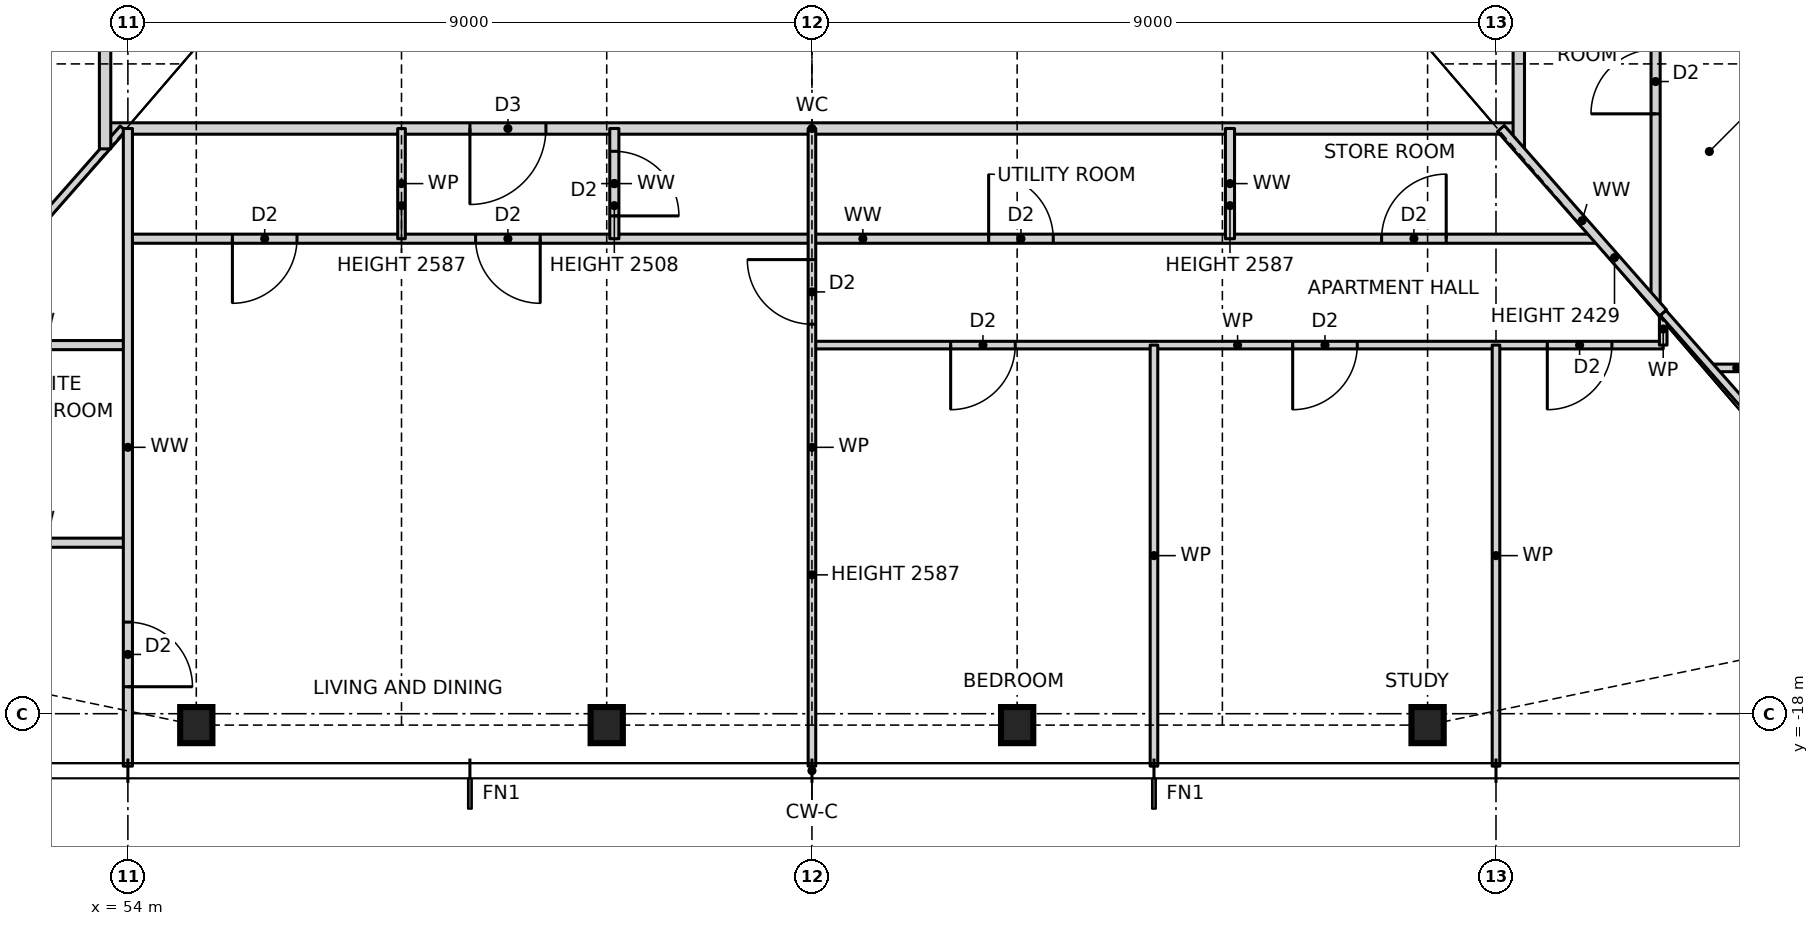
"""IFC4 building model, lengths in metres.
Left out: names, types, materials, properties, quantities, classifications, styles, units other than length and angle.
Written with IfcOpenShell. Run it as: python <this file> out.ifc"""

import sys

from ifc_helpers import new_model, si_unit, direction, frame, frame_2d, origin, origin_2d, place, context, subcontext, project, spatial, rectangle, i_section, extrude, element, fill, save


model = new_model("IFC4")
c1 = context("Model", 3, precision=1e-05, world=origin(), true_north=direction((0.0, 1.0)))
c2 = subcontext(c1, "Body", "Model", "MODEL_VIEW")
j1 = project(units=[si_unit("LENGTHUNIT", "METRE"), si_unit("PLANEANGLEUNIT", "RADIAN")], contexts=[c1])
p1 = place(None, origin())
s1 = spatial("IfcSite", under=j1, at=p1, CompositionType="ELEMENT")
p2 = place(p1, origin())
s2 = spatial("IfcBuilding", under=s1, at=p2, CompositionType="ELEMENT")
p3 = place(p2, frame((0.0, 0.0, 29.0)))
s3 = spatial("IfcBuildingStorey", under=s2, at=p3, CompositionType="ELEMENT", Elevation=29.0)
for number, where, z_axis, x_axis in (
    (1, (54.9, -18.15, 0.0), (0.0, 0.0, 1.0), (1.0, 0.0, 0.0)),
    (2, (60.3, -18.15, 0.0), (0.0, 0.0, 1.0), (1.0, 0.0, 0.0)),
    (3, (65.7, -18.15, 0.0), (0.0, 0.0, 1.0), (1.0, 0.0, 0.0)),
    (4, (71.1, -18.15, 0.0), (0.0, 0.0, 1.0), (1.0, 0.0, 0.0)),
):
    element("IfcColumn", number, at=place(p3, frame(where, z_axis=z_axis, x_axis=x_axis)), inside=s3, PredefinedType="COLUMN", context=c2, shape_type="SweptSolid", body=[
        extrude(i_section(OverallWidth=0.424, OverallDepth=0.475, WebThickness=0.048, FlangeThickness=0.077, at=origin_2d()), origin(), (0.0, 0.0, 1.0), 3.5),
    ])
p4 = place(p3, frame((51.6, -15.75, 0.0), z_axis=(0.0, 0.0, 1.0), x_axis=(1.0, 0.0, 0.0)))
e5 = element("IfcWall", 5, at=p4, inside=s3, PredefinedType="PARTITIONING", context=c2, shape_type="SweptSolid", body=[
    extrude(rectangle(XDim=2.4, YDim=0.12, at=frame_2d((1.2, 0.0))), origin(), (0.0, 0.0, 1.0), 3.27),
])
p5 = place(p3, frame((74.836, -13.45, 0.0), z_axis=(0.0, 0.0, 1.0), x_axis=(1.0, 0.0, 0.0)))
e6 = element("IfcWall", 6, at=p5, inside=s3, PredefinedType="PARTITIONING", context=c2, shape_type="SweptSolid", body=[
    extrude(rectangle(XDim=0.664, YDim=0.1, at=frame_2d((0.332, 0.0))), origin(), (0.0, 0.0, 1.0), 3.27),
])
p6 = place(p3, frame((51.6, -13.15, 0.0), z_axis=(0.0, 0.0, 1.0), x_axis=(1.0, 0.0, 0.0)))
e7 = element("IfcWall", 7, at=p6, inside=s3, PredefinedType="PARTITIONING", context=c2, shape_type="SweptSolid", body=[
    extrude(rectangle(XDim=2.4, YDim=0.12, at=frame_2d((1.2, 0.0))), origin(), (0.0, 0.0, 1.0), 3.27),
])
p7 = place(p3, frame((63.0, -13.15, 0.0), z_axis=(0.0, 0.0, 1.0), x_axis=(1.0, 0.0, 0.0)))
e8 = element("IfcWall", 8, at=p7, inside=s3, PredefinedType="PARTITIONING", context=c2, shape_type="SweptSolid", body=[
    extrude(rectangle(XDim=11.2, YDim=0.1, at=frame_2d((5.6, 0.0))), origin(), (0.0, 0.0, 1.0), 3.27),
])
p8 = place(p7, frame((1.825, 0.0, 0.0)))
e9 = element("IfcOpeningElement", 9, at=p8, cuts=e8, PredefinedType="OPENING", context=c2, shape_type="SweptSolid", body=[
    extrude(rectangle(XDim=0.85, YDim=2.1, at=frame_2d((0.425, 1.05))), frame((0.0, 0.06, 0.0), z_axis=(0.0, -1.0, 0.0), x_axis=(1.0, 0.0, 0.0)), (0.0, 0.0, 1.0), 0.12),
])
p9 = place(p7, frame((6.325, 0.0, 0.0)))
e10 = element("IfcOpeningElement", 10, at=p9, cuts=e8, PredefinedType="OPENING", context=c2, shape_type="SweptSolid", body=[
    extrude(rectangle(XDim=0.85, YDim=2.1, at=frame_2d((0.425, 1.05))), frame((0.0, 0.06, 0.0), z_axis=(0.0, -1.0, 0.0), x_axis=(1.0, 0.0, 0.0)), (0.0, 0.0, 1.0), 0.12),
])
p10 = place(p7, frame((9.675, 0.0, 0.0)))
e11 = element("IfcOpeningElement", 11, at=p10, cuts=e8, PredefinedType="OPENING", context=c2, shape_type="SweptSolid", body=[
    extrude(rectangle(XDim=0.85, YDim=2.1, at=frame_2d((0.425, 1.05))), frame((0.0, 0.06, 0.0), z_axis=(0.0, -1.0, 0.0), x_axis=(1.0, 0.0, 0.0)), (0.0, 0.0, 1.0), 0.12),
])
p11 = place(p3, frame((54.0, -11.75, 0.0), z_axis=(0.0, 0.0, 1.0), x_axis=(1.0, 0.0, 0.0)))
e12 = element("IfcWall", 12, at=p11, inside=s3, PredefinedType="PARTITIONING", context=c2, shape_type="SweptSolid", body=[
    extrude(rectangle(XDim=19.34, YDim=0.12, at=frame_2d((9.67, 0.0))), origin(), (0.0, 0.0, 1.0), 3.27),
])
p12 = place(p11, frame((1.375, 0.0, 0.0)))
e13 = element("IfcOpeningElement", 13, at=p12, cuts=e12, PredefinedType="OPENING", context=c2, shape_type="SweptSolid", body=[
    extrude(rectangle(XDim=0.85, YDim=2.1, at=frame_2d((0.425, 1.05))), frame((0.0, 0.07, 0.0), z_axis=(0.0, -1.0, 0.0), x_axis=(1.0, 0.0, 0.0)), (0.0, 0.0, 1.0), 0.14),
])
p13 = place(p11, frame((4.575, 0.0, 0.0)))
e14 = element("IfcOpeningElement", 14, at=p13, cuts=e12, PredefinedType="OPENING", context=c2, shape_type="SweptSolid", body=[
    extrude(rectangle(XDim=0.85, YDim=2.1, at=frame_2d((0.425, 1.05))), frame((0.0, 0.07, 0.0), z_axis=(0.0, -1.0, 0.0), x_axis=(1.0, 0.0, 0.0)), (0.0, 0.0, 1.0), 0.14),
])
p14 = place(p11, frame((11.325, 0.0, 0.0)))
e15 = element("IfcOpeningElement", 15, at=p14, cuts=e12, PredefinedType="OPENING", context=c2, shape_type="SweptSolid", body=[
    extrude(rectangle(XDim=0.85, YDim=2.1, at=frame_2d((0.425, 1.05))), frame((0.0, 0.07, 0.0), z_axis=(0.0, -1.0, 0.0), x_axis=(1.0, 0.0, 0.0)), (0.0, 0.0, 1.0), 0.14),
])
p15 = place(p11, frame((16.495, 0.0, 0.0)))
e16 = element("IfcOpeningElement", 16, at=p15, cuts=e12, PredefinedType="OPENING", context=c2, shape_type="SweptSolid", body=[
    extrude(rectangle(XDim=0.85, YDim=2.1, at=frame_2d((0.425, 1.05))), frame((0.0, 0.07, 0.0), z_axis=(0.0, -1.0, 0.0), x_axis=(1.0, 0.0, 0.0)), (0.0, 0.0, 1.0), 0.14),
])
p16 = place(p3, frame((53.7, -10.3, 0.0), z_axis=(0.0, 0.0, 1.0), x_axis=(1.0, 0.0, 0.0)))
e17 = element("IfcWall", 17, at=p16, inside=s3, PredefinedType="PARTITIONING", context=c2, shape_type="SweptSolid", body=[
    extrude(rectangle(XDim=18.6, YDim=0.15, at=frame_2d((9.3, 0.0))), origin(), (0.0, 0.0, 1.0), 3.27),
])
p17 = place(p16, frame((4.8, 0.0, 0.0)))
e18 = element("IfcOpeningElement", 18, at=p17, cuts=e17, PredefinedType="OPENING", context=c2, shape_type="SweptSolid", body=[
    extrude(rectangle(XDim=1.0, YDim=2.1, at=frame_2d((0.5, 1.05))), frame((0.0, 0.085, 0.0), z_axis=(0.0, -1.0, 0.0), x_axis=(1.0, 0.0, 0.0)), (0.0, 0.0, 1.0), 0.17),
])
p18 = place(p3, frame((47.944, -17.109, 0.0), z_axis=(0.0, 0.0, 1.0), x_axis=(0.660638210404, 0.750704439146, 0.0)))
e19 = element("IfcWall", 19, at=p18, inside=s3, PredefinedType="PARTITIONING", context=c2, shape_type="SweptSolid", body=[
    extrude(rectangle(XDim=9.07, YDim=0.1, at=frame_2d((4.535, 0.0))), origin(), (0.0, 0.0, 1.0), 2.429),
])
p19 = place(p3, frame((74.2, -13.15, 0.0), z_axis=(0.0, 0.0, 1.0), x_axis=(0.0, 1.0, 0.0)))
e20 = element("IfcWall", 20, at=p19, inside=s3, PredefinedType="PARTITIONING", context=c2, shape_type="SweptSolid", body=[
    extrude(rectangle(XDim=0.423, YDim=0.1, at=frame_2d((0.211, 0.0))), origin(), (0.0, 0.0, 1.0), 3.27),
])
p20 = place(p3, frame((74.1, -12.614, 0.0), z_axis=(0.0, 0.0, 1.0), x_axis=(0.0, 1.0, 0.0)))
e21 = element("IfcWall", 21, at=p20, inside=s3, PredefinedType="PARTITIONING", context=c2, shape_type="SweptSolid", body=[
    extrude(rectangle(XDim=25.228, YDim=0.12, at=frame_2d((12.614, 0.0))), origin(), (0.0, 0.0, 1.0), 3.27),
])
p21 = place(p20, frame((7.239, 0.0, 0.0)))
e22 = element("IfcOpeningElement", 22, at=p21, cuts=e21, PredefinedType="OPENING", context=c2, shape_type="SweptSolid", body=[
    extrude(rectangle(XDim=0.85, YDim=2.1, at=frame_2d((0.425, 1.05))), frame((0.0, 0.07, 0.0), z_axis=(0.0, -1.0, 0.0), x_axis=(1.0, 0.0, 0.0)), (0.0, 0.0, 1.0), 0.14),
])
p22 = place(p20, frame((10.439, 0.0, 0.0)))
e23 = element("IfcOpeningElement", 23, at=p22, cuts=e21, PredefinedType="OPENING", context=c2, shape_type="SweptSolid", body=[
    extrude(rectangle(XDim=0.85, YDim=2.1, at=frame_2d((0.425, 1.05))), frame((0.0, 0.07, 0.0), z_axis=(0.0, -1.0, 0.0), x_axis=(1.0, 0.0, 0.0)), (0.0, 0.0, 1.0), 0.14),
])
p23 = place(p20, frame((2.507, 0.0, 0.0)))
e24 = element("IfcOpeningElement", 24, at=p23, cuts=e21, PredefinedType="OPENING", context=c2, shape_type="SweptSolid", body=[
    extrude(rectangle(XDim=0.85, YDim=2.1, at=frame_2d((0.425, 1.05))), frame((0.0, 0.07, 0.0), z_axis=(0.0, -1.0, 0.0), x_axis=(1.0, 0.0, 0.0)), (0.0, 0.0, 1.0), 0.14),
])
p24 = place(p20, frame((16.639, 0.0, 0.0)))
e25 = element("IfcOpeningElement", 25, at=p24, cuts=e21, PredefinedType="OPENING", context=c2, shape_type="SweptSolid", body=[
    extrude(rectangle(XDim=0.85, YDim=2.1, at=frame_2d((0.425, 1.05))), frame((0.0, 0.07, 0.0), z_axis=(0.0, -1.0, 0.0), x_axis=(1.0, 0.0, 0.0)), (0.0, 0.0, 1.0), 0.14),
])
p25 = place(p20, frame((21.821, 0.0, 0.0)))
e26 = element("IfcOpeningElement", 26, at=p25, cuts=e21, PredefinedType="OPENING", context=c2, shape_type="SweptSolid", body=[
    extrude(rectangle(XDim=0.85, YDim=2.1, at=frame_2d((0.425, 1.05))), frame((0.0, 0.07, 0.0), z_axis=(0.0, -1.0, 0.0), x_axis=(1.0, 0.0, 0.0)), (0.0, 0.0, 1.0), 0.14),
])
p26 = place(p3, frame((72.3, -10.568, 0.0), z_axis=(0.0, 0.0, 1.0), x_axis=(0.0, 1.0, 0.0)))
e27 = element("IfcWall", 27, at=p26, inside=s3, PredefinedType="PARTITIONING", context=c2, shape_type="SweptSolid", body=[
    extrude(rectangle(XDim=21.136, YDim=0.15, at=frame_2d((10.568, 0.0))), origin(), (0.0, 0.0, 1.0), 3.27),
])
p27 = place(p26, frame((8.318, 0.0, 0.0)))
e28 = element("IfcOpeningElement", 28, at=p27, cuts=e27, PredefinedType="OPENING", context=c2, shape_type="SweptSolid", body=[
    extrude(rectangle(XDim=1.0, YDim=2.1, at=frame_2d((0.5, 1.05))), frame((0.0, 0.085, 0.0), z_axis=(0.0, -1.0, 0.0), x_axis=(1.0, 0.0, 0.0)), (0.0, 0.0, 1.0), 0.17),
])
p28 = place(p3, frame((72.0, -18.69, 0.0), z_axis=(0.0, 0.0, 1.0), x_axis=(0.0, 1.0, 0.0)))
e29 = element("IfcWall", 29, at=p28, inside=s3, PredefinedType="PARTITIONING", context=c2, shape_type="SweptSolid", body=[
    extrude(rectangle(XDim=5.54, YDim=0.1, at=frame_2d((2.77, 0.0))), origin(), (0.0, 0.0, 1.0), 3.27),
])
p29 = place(p3, frame((68.5, -11.75, 0.0), z_axis=(0.0, 0.0, 1.0), x_axis=(0.0, 1.0, 0.0)))
e30 = element("IfcWall", 30, at=p29, inside=s3, PredefinedType="PARTITIONING", context=c2, shape_type="SweptSolid", body=[
    extrude(rectangle(XDim=1.45, YDim=0.12, at=frame_2d((0.725, 0.0))), origin(), (0.0, 0.0, 1.0), 2.587),
])
p30 = place(p3, frame((67.5, -18.69, 0.0), z_axis=(0.0, 0.0, 1.0), x_axis=(0.0, 1.0, 0.0)))
e31 = element("IfcWall", 31, at=p30, inside=s3, PredefinedType="PARTITIONING", context=c2, shape_type="SweptSolid", body=[
    extrude(rectangle(XDim=5.54, YDim=0.1, at=frame_2d((2.77, 0.0))), origin(), (0.0, 0.0, 1.0), 3.27),
])
p31 = place(p3, frame((63.0, -18.69, 0.0), z_axis=(0.0, 0.0, 1.0), x_axis=(0.0, 1.0, 0.0)))
e32 = element("IfcWall", 32, at=p31, inside=s3, PredefinedType="PARTITIONING", context=c2, shape_type="SweptSolid", body=[
    extrude(rectangle(XDim=8.39, YDim=0.1, at=frame_2d((4.195, 0.0))), origin(), (0.0, 0.0, 1.0), 2.587),
])
p32 = place(p31, frame((5.815, 0.0, 0.0)))
e33 = element("IfcOpeningElement", 33, at=p32, cuts=e32, PredefinedType="OPENING", context=c2, shape_type="SweptSolid", body=[
    extrude(rectangle(XDim=0.85, YDim=2.1, at=frame_2d((0.425, 1.05))), frame((0.0, 0.06, 0.0), z_axis=(0.0, -1.0, 0.0), x_axis=(1.0, 0.0, 0.0)), (0.0, 0.0, 1.0), 0.12),
])
p33 = place(p3, frame((60.4, -11.75, 0.0), z_axis=(0.0, 0.0, 1.0), x_axis=(0.0, 1.0, 0.0)))
e34 = element("IfcWall", 34, at=p33, inside=s3, PredefinedType="PARTITIONING", context=c2, shape_type="SweptSolid", body=[
    extrude(rectangle(XDim=1.45, YDim=0.12, at=frame_2d((0.725, 0.0))), origin(), (0.0, 0.0, 1.0), 2.508),
])
p34 = place(p33, frame((0.3, 0.0, 0.0)))
e35 = element("IfcOpeningElement", 35, at=p34, cuts=e34, PredefinedType="OPENING", context=c2, shape_type="SweptSolid", body=[
    extrude(rectangle(XDim=0.85, YDim=2.1, at=frame_2d((0.425, 1.05))), frame((0.0, 0.07, 0.0), z_axis=(0.0, -1.0, 0.0), x_axis=(1.0, 0.0, 0.0)), (0.0, 0.0, 1.0), 0.14),
])
p35 = place(p3, frame((57.6, -11.75, 0.0), z_axis=(0.0, 0.0, 1.0), x_axis=(0.0, 1.0, 0.0)))
e36 = element("IfcWall", 36, at=p35, inside=s3, PredefinedType="PARTITIONING", context=c2, shape_type="SweptSolid", body=[
    extrude(rectangle(XDim=1.45, YDim=0.1, at=frame_2d((0.725, 0.0))), origin(), (0.0, 0.0, 1.0), 2.587),
])
p36 = place(p3, frame((54.0, -18.69, 0.0), z_axis=(0.0, 0.0, 1.0), x_axis=(0.0, 1.0, 0.0)))
e37 = element("IfcWall", 37, at=p36, inside=s3, PredefinedType="PARTITIONING", context=c2, shape_type="SweptSolid", body=[
    extrude(rectangle(XDim=8.39, YDim=0.12, at=frame_2d((4.195, 0.0))), origin(), (0.0, 0.0, 1.0), 3.27),
])
p37 = place(p36, frame((1.045, 0.0, 0.0)))
e38 = element("IfcOpeningElement", 38, at=p37, cuts=e37, PredefinedType="OPENING", context=c2, shape_type="SweptSolid", body=[
    extrude(rectangle(XDim=0.85, YDim=2.1, at=frame_2d((0.425, 1.05))), frame((0.0, 0.07, 0.0), z_axis=(0.0, -1.0, 0.0), x_axis=(1.0, 0.0, 0.0)), (0.0, 0.0, 1.0), 0.14),
])
p38 = place(p3, frame((53.7, -10.568, 0.0), z_axis=(0.0, 0.0, 1.0), x_axis=(0.0, 1.0, 0.0)))
e39 = element("IfcWall", 39, at=p38, inside=s3, PredefinedType="PARTITIONING", context=c2, shape_type="SweptSolid", body=[
    extrude(rectangle(XDim=21.136, YDim=0.15, at=frame_2d((10.568, 0.0))), origin(), (0.0, 0.0, 1.0), 3.27),
])
p39 = place(p38, frame((11.818, 0.0, 0.0)))
e40 = element("IfcOpeningElement", 40, at=p39, cuts=e39, PredefinedType="OPENING", context=c2, shape_type="SweptSolid", body=[
    extrude(rectangle(XDim=1.0, YDim=2.1, at=frame_2d((0.5, 1.05))), frame((0.0, 0.085, 0.0), z_axis=(0.0, -1.0, 0.0), x_axis=(1.0, 0.0, 0.0)), (0.0, 0.0, 1.0), 0.17),
])
p40 = place(p3, frame((74.2, -12.727, 0.0), z_axis=(0.0, 0.0, 1.0), x_axis=(-0.660667046586, 0.75067906162, 0.0)))
e41 = element("IfcWall", 41, at=p40, inside=s3, PredefinedType="PARTITIONING", context=c2, shape_type="SweptSolid", body=[
    extrude(rectangle(XDim=3.233, YDim=0.12, at=frame_2d((1.617, 0.0))), origin(), (0.0, 0.0, 1.0), 2.429),
])
p41 = place(p3, frame((78.057, -17.109, 0.0), z_axis=(0.0, 0.0, 1.0), x_axis=(-0.660698595885, 0.750651294141, 0.0)))
e42 = element("IfcWall", 42, at=p41, inside=s3, PredefinedType="PARTITIONING", context=c2, shape_type="SweptSolid", body=[
    extrude(rectangle(XDim=5.838, YDim=0.1, at=frame_2d((2.919, 0.0))), origin(), (0.0, 0.0, 1.0), 2.429),
])
p42 = place(p12, frame((0.85, 0.0, 0.0), z_axis=(0.0, 0.0, 1.0), x_axis=(-1.0, 0.0, 0.0)))
e43 = element("IfcDoor", 43, at=p42, inside=s3, OperationType="SINGLE_SWING_RIGHT", PredefinedType="DOOR", context=c2, shape_type="SweptSolid", body=[
    extrude(rectangle(XDim=0.85, YDim=2.1, at=frame_2d((0.425, 1.05))), frame((0.0, 0.025, 0.0), z_axis=(0.0, -1.0, 0.0), x_axis=(1.0, 0.0, 0.0)), (0.0, 0.0, 1.0), 0.05),
])
fill(e13, e43)
p43 = place(p17, frame((1.0, 0.0, 0.0), z_axis=(0.0, 0.0, 1.0), x_axis=(-1.0, 0.0, 0.0)))
e44 = element("IfcDoor", 44, at=p43, inside=s3, OperationType="SINGLE_SWING_RIGHT", PredefinedType="DOOR", context=c2, shape_type="SweptSolid", body=[
    extrude(rectangle(XDim=1.0, YDim=2.1, at=frame_2d((0.5, 1.05))), frame((0.0, 0.025, 0.0), z_axis=(0.0, -1.0, 0.0), x_axis=(1.0, 0.0, 0.0)), (0.0, 0.0, 1.0), 0.05),
])
fill(e18, e44)
p44 = place(p13, frame((0.85, 0.0, 0.0), z_axis=(0.0, 0.0, 1.0), x_axis=(-1.0, 0.0, 0.0)))
e45 = element("IfcDoor", 45, at=p44, inside=s3, OperationType="SINGLE_SWING_LEFT", PredefinedType="DOOR", context=c2, shape_type="SweptSolid", body=[
    extrude(rectangle(XDim=0.85, YDim=2.1, at=frame_2d((0.425, 1.05))), frame((0.0, 0.025, 0.0), z_axis=(0.0, -1.0, 0.0), x_axis=(1.0, 0.0, 0.0)), (0.0, 0.0, 1.0), 0.05),
])
fill(e14, e45)
p45 = place(p34, frame((0.85, 0.0, 0.0), z_axis=(0.0, 0.0, 1.0), x_axis=(-1.0, 0.0, 0.0)))
e46 = element("IfcDoor", 46, at=p45, inside=s3, OperationType="SINGLE_SWING_RIGHT", PredefinedType="DOOR", context=c2, shape_type="SweptSolid", body=[
    extrude(rectangle(XDim=0.85, YDim=2.1, at=frame_2d((0.425, 1.05))), frame((0.0, 0.025, 0.0), z_axis=(0.0, -1.0, 0.0), x_axis=(1.0, 0.0, 0.0)), (0.0, 0.0, 1.0), 0.05),
])
fill(e35, e46)
p46 = place(p37, frame((0.85, 0.0, 0.0), z_axis=(0.0, 0.0, 1.0), x_axis=(-1.0, 0.0, 0.0)))
e47 = element("IfcDoor", 47, at=p46, inside=s3, OperationType="SINGLE_SWING_RIGHT", PredefinedType="DOOR", context=c2, shape_type="SweptSolid", body=[
    extrude(rectangle(XDim=0.85, YDim=2.1, at=frame_2d((0.425, 1.05))), frame((0.0, 0.025, 0.0), z_axis=(0.0, -1.0, 0.0), x_axis=(1.0, 0.0, 0.0)), (0.0, 0.0, 1.0), 0.05),
])
fill(e38, e47)
p47 = place(p32, origin())
e48 = element("IfcDoor", 48, at=p47, inside=s3, OperationType="SINGLE_SWING_RIGHT", PredefinedType="DOOR", context=c2, shape_type="SweptSolid", body=[
    extrude(rectangle(XDim=0.85, YDim=2.1, at=frame_2d((0.425, 1.05))), frame((0.0, 0.025, 0.0), z_axis=(0.0, -1.0, 0.0), x_axis=(1.0, 0.0, 0.0)), (0.0, 0.0, 1.0), 0.05),
])
fill(e33, e48)
p48 = place(p8, frame((0.85, 0.0, 0.0), z_axis=(0.0, 0.0, 1.0), x_axis=(-1.0, 0.0, 0.0)))
e49 = element("IfcDoor", 49, at=p48, inside=s3, OperationType="SINGLE_SWING_RIGHT", PredefinedType="DOOR", context=c2, shape_type="SweptSolid", body=[
    extrude(rectangle(XDim=0.85, YDim=2.1, at=frame_2d((0.425, 1.05))), frame((0.0, 0.025, 0.0), z_axis=(0.0, -1.0, 0.0), x_axis=(1.0, 0.0, 0.0)), (0.0, 0.0, 1.0), 0.05),
])
fill(e9, e49)
p49 = place(p9, frame((0.85, 0.0, 0.0), z_axis=(0.0, 0.0, 1.0), x_axis=(-1.0, 0.0, 0.0)))
e50 = element("IfcDoor", 50, at=p49, inside=s3, OperationType="SINGLE_SWING_RIGHT", PredefinedType="DOOR", context=c2, shape_type="SweptSolid", body=[
    extrude(rectangle(XDim=0.85, YDim=2.1, at=frame_2d((0.425, 1.05))), frame((0.0, 0.025, 0.0), z_axis=(0.0, -1.0, 0.0), x_axis=(1.0, 0.0, 0.0)), (0.0, 0.0, 1.0), 0.05),
])
fill(e10, e50)
p50 = place(p10, frame((0.85, 0.0, 0.0), z_axis=(0.0, 0.0, 1.0), x_axis=(-1.0, 0.0, 0.0)))
e51 = element("IfcDoor", 51, at=p50, inside=s3, OperationType="SINGLE_SWING_RIGHT", PredefinedType="DOOR", context=c2, shape_type="SweptSolid", body=[
    extrude(rectangle(XDim=0.85, YDim=2.1, at=frame_2d((0.425, 1.05))), frame((0.0, 0.025, 0.0), z_axis=(0.0, -1.0, 0.0), x_axis=(1.0, 0.0, 0.0)), (0.0, 0.0, 1.0), 0.05),
])
fill(e11, e51)
p51 = place(p14, origin())
e52 = element("IfcDoor", 52, at=p51, inside=s3, OperationType="SINGLE_SWING_LEFT", PredefinedType="DOOR", context=c2, shape_type="SweptSolid", body=[
    extrude(rectangle(XDim=0.85, YDim=2.1, at=frame_2d((0.425, 1.05))), frame((0.0, 0.025, 0.0), z_axis=(0.0, -1.0, 0.0), x_axis=(1.0, 0.0, 0.0)), (0.0, 0.0, 1.0), 0.05),
])
fill(e15, e52)
p52 = place(p15, origin())
e53 = element("IfcDoor", 53, at=p52, inside=s3, OperationType="SINGLE_SWING_RIGHT", PredefinedType="DOOR", context=c2, shape_type="SweptSolid", body=[
    extrude(rectangle(XDim=0.85, YDim=2.1, at=frame_2d((0.425, 1.05))), frame((0.0, 0.025, 0.0), z_axis=(0.0, -1.0, 0.0), x_axis=(1.0, 0.0, 0.0)), (0.0, 0.0, 1.0), 0.05),
])
fill(e16, e53)
p53 = place(p23, origin())
e54 = element("IfcDoor", 54, at=p53, inside=s3, OperationType="SINGLE_SWING_LEFT", PredefinedType="DOOR", context=c2, shape_type="SweptSolid", body=[
    extrude(rectangle(XDim=0.85, YDim=2.1, at=frame_2d((0.425, 1.05))), frame((0.0, 0.025, 0.0), z_axis=(0.0, -1.0, 0.0), x_axis=(1.0, 0.0, 0.0)), (0.0, 0.0, 1.0), 0.05),
])
fill(e24, e54)
save(model, sys.argv[1])
